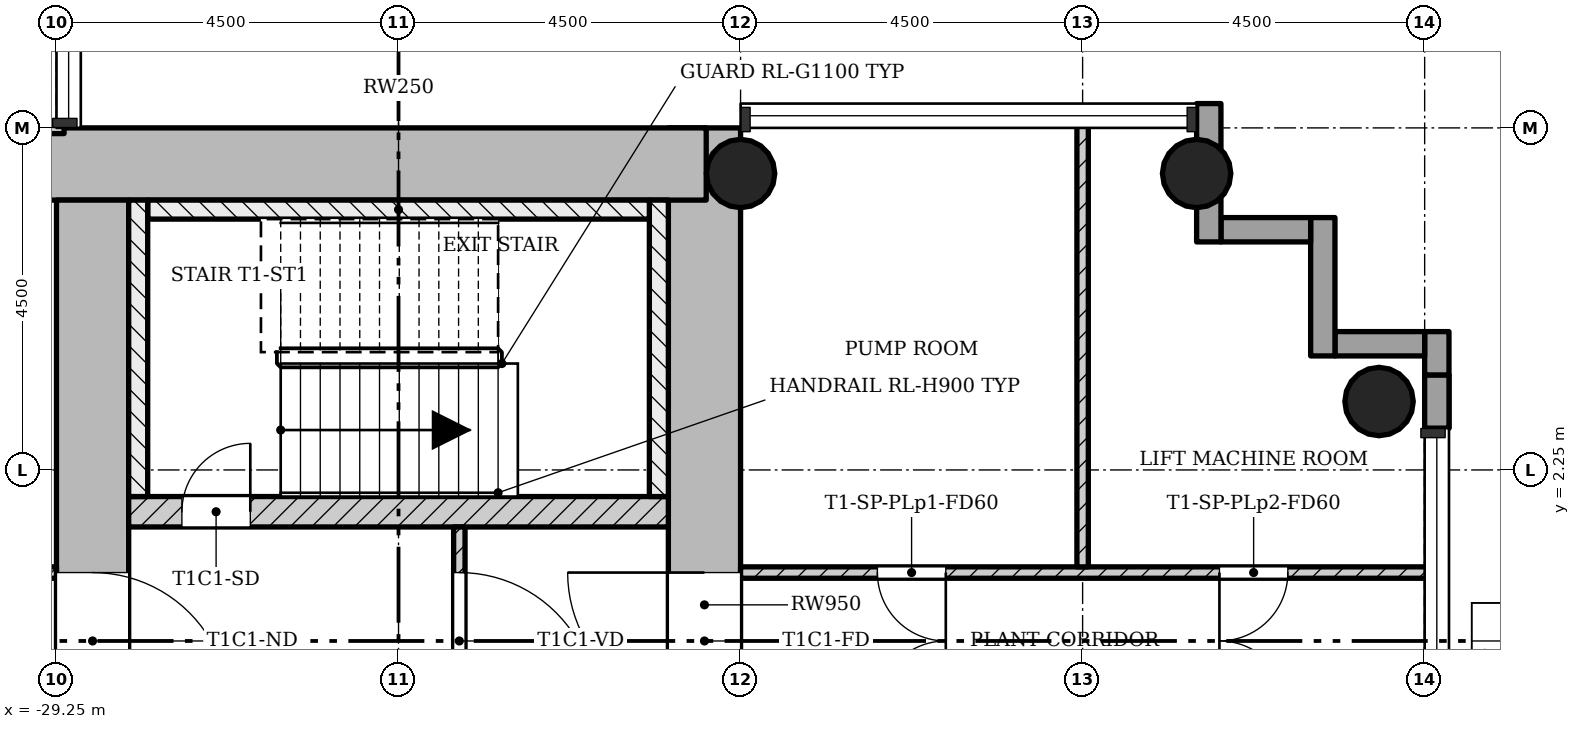
"""IFC4 building model, lengths in metres.
Left out: names, types, materials, properties, quantities, classifications, styles, units other than length and angle.
Written with IfcOpenShell. Run it as: python <this file> out.ifc"""

import sys

from ifc_helpers import new_model, si_unit, direction, frame, frame_2d, origin, origin_2d, place, context, subcontext, project, spatial, rectangle, hollow_circle, extrude, element, fill, save


model = new_model("IFC4")
c1 = context("Model", 3, precision=1e-05, world=origin(), true_north=direction((0.0, 1.0)))
c2 = subcontext(c1, "Body", "Model", "MODEL_VIEW")
j1 = project(units=[si_unit("LENGTHUNIT", "METRE"), si_unit("PLANEANGLEUNIT", "RADIAN")], contexts=[c1])
p1 = place(None, origin())
s1 = spatial("IfcSite", under=j1, at=p1, CompositionType="ELEMENT")
p2 = place(p1, origin())
s2 = spatial("IfcBuilding", under=s1, at=p2, CompositionType="ELEMENT")
p3 = place(p2, frame((0.0, 0.0, 124.2)))
s3 = spatial("IfcBuildingStorey", under=s2, at=p3, CompositionType="ELEMENT", Elevation=124.2)
p4 = place(p3, frame((-20.725, -5.8, 0.0), z_axis=(0.0, 0.0, 1.0), x_axis=(0.0, 1.0, 0.0)))
e1 = element("IfcWall", 1, at=p4, inside=s3, PredefinedType="SHEAR", context=c2, shape_type="SweptSolid", body=[
    extrude(rectangle(XDim=12.55, YDim=0.95, at=frame_2d((6.275, 0.0))), origin(), (0.0, 0.0, 1.0), 4.5),
])
p5 = place(p4, frame((4.9, 0.0, 0.0)))
e2 = element("IfcOpeningElement", 2, at=p5, cuts=e1, PredefinedType="OPENING", context=c2, shape_type="SweptSolid", body=[
    extrude(rectangle(XDim=1.8, YDim=2.1, at=frame_2d((0.9, 1.05))), frame((0.0, 0.485, 0.0), z_axis=(0.0, -1.0, 0.0), x_axis=(1.0, 0.0, 0.0)), (0.0, 0.0, 1.0), 0.97),
])
p6 = place(p3, frame((-20.702, 6.275, 0.0), z_axis=(0.0, 0.0, 1.0), x_axis=(-1.0, 0.0, 0.0)))
e3 = element("IfcWall", 3, at=p6, inside=s3, PredefinedType="SHEAR", context=c2, shape_type="SweptSolid", body=[
    extrude(rectangle(XDim=8.696, YDim=0.95, at=frame_2d((4.348, 0.0))), origin(), (0.0, 0.0, 1.0), 4.5),
])
p7 = place(p3, frame((-28.775, 5.8, 0.0), z_axis=(0.0, 0.0, 1.0), x_axis=(0.0, -1.0, 0.0)))
e4 = element("IfcWall", 4, at=p7, inside=s3, PredefinedType="SHEAR", context=c2, shape_type="SweptSolid", body=[
    extrude(rectangle(XDim=12.55, YDim=0.95, at=frame_2d((6.275, 0.0))), origin(), (0.0, 0.0, 1.0), 4.5),
])
p8 = place(p7, frame((4.9, 0.0, 0.0)))
e5 = element("IfcOpeningElement", 5, at=p8, cuts=e4, PredefinedType="OPENING", context=c2, shape_type="SweptSolid", body=[
    extrude(rectangle(XDim=1.8, YDim=2.1, at=frame_2d((0.9, 1.05))), frame((0.0, 0.485, 0.0), z_axis=(0.0, -1.0, 0.0), x_axis=(1.0, 0.0, 0.0)), (0.0, 0.0, 1.0), 0.97),
])
p9 = place(p3, frame((-28.3, 1.7, 0.0), z_axis=(0.0, 0.0, 1.0), x_axis=(1.0, 0.0, 0.0)))
e6 = element("IfcWall", 6, at=p9, inside=s3, PredefinedType="SHEAR", context=c2, shape_type="SweptSolid", body=[
    extrude(rectangle(XDim=7.1, YDim=0.4, at=frame_2d((3.55, 0.0))), origin(), (0.0, 0.0, 1.0), 4.5),
])
p10 = place(p9, frame((0.7, 0.0, 0.0)))
e7 = element("IfcOpeningElement", 7, at=p10, cuts=e6, PredefinedType="OPENING", context=c2, shape_type="SweptSolid", body=[
    extrude(rectangle(XDim=0.9, YDim=2.1, at=frame_2d((0.45, 1.05))), frame((0.0, 0.21, 0.0), z_axis=(0.0, -1.0, 0.0), x_axis=(1.0, 0.0, 0.0)), (0.0, 0.0, 1.0), 0.42),
])
for number, where, z_axis, x_axis in (
    (8, (-20.25, 6.15, 0.0), (0.0, 0.0, 1.0), (1.0, 0.0, 0.0)),
    (9, (-14.25, 6.15, 0.0), (0.0, 0.0, 1.0), (1.0, 0.0, 0.0)),
    (10, (-11.85, 3.15, 0.0), (0.0, 0.0, 1.0), (1.0, 0.0, 0.0)),
):
    element("IfcColumn", number, at=place(p3, frame(where, z_axis=z_axis, x_axis=x_axis)), inside=s3, PredefinedType="COLUMN", context=c2, shape_type="SweptSolid", body=[
        extrude(hollow_circle(Radius=0.45, WallThickness=0.032, at=origin_2d()), origin(), (0.0, 0.0, 1.0), 4.5),
    ])
p11 = place(p3, frame((-11.09, 2.8, 0.0), z_axis=(0.0, 0.0, 1.0), x_axis=(0.0, 1.0, 0.0)))
e11 = element("IfcWall", 11, at=p11, inside=s3, PredefinedType="STANDARD", context=c2, shape_type="SweptSolid", body=[
    extrude(rectangle(XDim=0.7, YDim=0.32, at=frame_2d((0.35, 0.0))), origin(), (0.0, 0.0, 1.0), 3.61),
])
p12 = place(p3, frame((-11.09, 2.8, 4.08), z_axis=(0.0, 0.0, 1.0), x_axis=(0.0, 1.0, 0.0)))
e12 = element("IfcWall", 12, at=p12, inside=s3, PredefinedType="STANDARD", context=c2, shape_type="SweptSolid", body=[
    extrude(rectangle(XDim=0.7, YDim=0.32, at=frame_2d((0.35, 0.0))), origin(), (0.0, 0.0, 1.0), 0.12),
])
p13 = place(p3, frame((-11.09, 3.5, 0.0), z_axis=(0.0, 0.0, 1.0), x_axis=(0.0, 1.0, 0.0)))
e13 = element("IfcWall", 13, at=p13, inside=s3, PredefinedType="STANDARD", context=c2, shape_type="SweptSolid", body=[
    extrude(rectangle(XDim=0.57, YDim=0.32, at=frame_2d((0.285, 0.0))), origin(), (0.0, 0.0, 1.0), 4.2),
])
p14 = place(p3, frame((-11.25, 3.91, -0.3), z_axis=(0.0, 0.0, 1.0), x_axis=(-1.0, 0.0, 0.0)))
e14 = element("IfcWall", 14, at=p14, inside=s3, PredefinedType="STANDARD", context=c2, shape_type="SweptSolid", body=[
    extrude(rectangle(XDim=1.18, YDim=0.32, at=frame_2d((0.59, 0.0))), origin(), (0.0, 0.0, 1.0), 4.5),
])
p15 = place(p3, frame((-12.59, 3.75, -0.3), z_axis=(0.0, 0.0, 1.0), x_axis=(0.0, 1.0, 0.0)))
e15 = element("IfcWall", 15, at=p15, inside=s3, PredefinedType="STANDARD", context=c2, shape_type="SweptSolid", body=[
    extrude(rectangle(XDim=1.82, YDim=0.32, at=frame_2d((0.91, 0.0))), origin(), (0.0, 0.0, 1.0), 4.5),
])
p16 = place(p3, frame((-12.75, 5.41, -0.3), z_axis=(0.0, 0.0, 1.0), x_axis=(-1.0, 0.0, 0.0)))
e16 = element("IfcWall", 16, at=p16, inside=s3, PredefinedType="STANDARD", context=c2, shape_type="SweptSolid", body=[
    extrude(rectangle(XDim=1.18, YDim=0.32, at=frame_2d((0.59, 0.0))), origin(), (0.0, 0.0, 1.0), 4.5),
])
p17 = place(p3, frame((-14.09, 5.25, -0.3), z_axis=(0.0, 0.0, 1.0), x_axis=(0.0, 1.0, 0.0)))
e17 = element("IfcWall", 17, at=p17, inside=s3, PredefinedType="STANDARD", context=c2, shape_type="SweptSolid", body=[
    extrude(rectangle(XDim=1.82, YDim=0.32, at=frame_2d((0.91, 0.0))), origin(), (0.0, 0.0, 1.0), 4.5),
])
p18 = place(p3, frame((-23.95, -1.5, 0.0), z_axis=(0.0, 0.0, 1.0), x_axis=(0.0, 1.0, 0.0)))
e18 = element("IfcWall", 18, at=p18, inside=s3, PredefinedType="PARTITIONING", context=c2, shape_type="SweptSolid", body=[
    extrude(rectangle(XDim=3.0, YDim=0.15, at=frame_2d((1.5, 0.0))), origin(), (0.0, 0.0, 1.0), 4.1),
])
p19 = place(p18, frame((0.6, 0.0, 0.0)))
e19 = element("IfcOpeningElement", 19, at=p19, cuts=e18, PredefinedType="OPENING", context=c2, shape_type="SweptSolid", body=[
    extrude(rectangle(XDim=1.8, YDim=2.1, at=frame_2d((0.9, 1.05))), frame((0.0, 0.085, 0.0), z_axis=(0.0, -1.0, 0.0), x_axis=(1.0, 0.0, 0.0)), (0.0, 0.0, 1.0), 0.17),
])
p20 = place(p3, frame((-35.1, 0.9, 0.0), z_axis=(0.0, 0.0, 1.0), x_axis=(1.0, 0.0, 0.0)))
e20 = element("IfcWall", 20, at=p20, inside=s3, PredefinedType="PARTITIONING", context=c2, shape_type="SweptSolid", body=[
    extrude(rectangle(XDim=5.85, YDim=0.15, at=frame_2d((2.925, 0.0))), origin(), (0.0, 0.0, 1.0), 4.1),
])
p21 = place(p20, frame((2.475, 0.0, 0.0)))
e21 = element("IfcOpeningElement", 21, at=p21, cuts=e20, PredefinedType="OPENING", context=c2, shape_type="SweptSolid", body=[
    extrude(rectangle(XDim=0.9, YDim=2.1, at=frame_2d((0.45, 1.05))), frame((0.0, 0.085, 0.0), z_axis=(0.0, -1.0, 0.0), x_axis=(1.0, 0.0, 0.0)), (0.0, 0.0, 1.0), 0.17),
])
p22 = place(p3, frame((-20.25, 0.9, 0.0), z_axis=(0.0, 0.0, 1.0), x_axis=(1.0, 0.0, 0.0)))
e22 = element("IfcWall", 22, at=p22, inside=s3, PredefinedType="PARTITIONING", context=c2, shape_type="SweptSolid", body=[
    extrude(rectangle(XDim=9.1, YDim=0.15, at=frame_2d((4.55, 0.0))), origin(), (0.0, 0.0, 1.0), 4.1),
])
p23 = place(p22, frame((1.8, 0.0, 0.0)))
e23 = element("IfcOpeningElement", 23, at=p23, cuts=e22, PredefinedType="OPENING", context=c2, shape_type="SweptSolid", body=[
    extrude(rectangle(XDim=0.9, YDim=2.1, at=frame_2d((0.45, 1.05))), frame((0.0, 0.085, 0.0), z_axis=(0.0, -1.0, 0.0), x_axis=(1.0, 0.0, 0.0)), (0.0, 0.0, 1.0), 0.17),
])
p24 = place(p22, frame((6.3, 0.0, 0.0)))
e24 = element("IfcOpeningElement", 24, at=p24, cuts=e22, PredefinedType="OPENING", context=c2, shape_type="SweptSolid", body=[
    extrude(rectangle(XDim=0.9, YDim=2.1, at=frame_2d((0.45, 1.05))), frame((0.0, 0.085, 0.0), z_axis=(0.0, -1.0, 0.0), x_axis=(1.0, 0.0, 0.0)), (0.0, 0.0, 1.0), 0.17),
])
p25 = place(p3, frame((-15.75, 0.975, 0.0), z_axis=(0.0, 0.0, 1.0), x_axis=(0.0, 1.0, 0.0)))
e25 = element("IfcWall", 25, at=p25, inside=s3, PredefinedType="PARTITIONING", context=c2, shape_type="SweptSolid", body=[
    extrude(rectangle(XDim=5.875, YDim=0.15, at=frame_2d((2.938, 0.0))), origin(), (0.0, 0.0, 1.0), 4.1),
])
p26 = place(p3, frame((-42.85, 6.75, 0.0), z_axis=(0.0, 0.0, 1.0), x_axis=(1.0, 0.0, 0.0)))
e26 = element("IfcWall", 26, at=p26, inside=s3, PredefinedType="PARTITIONING", context=c2, shape_type="SweptSolid", body=[
    extrude(rectangle(XDim=13.7, YDim=0.15, at=frame_2d((6.85, 0.0))), origin(), (0.0, 0.0, 1.0), 4.1),
])
p27 = place(p26, frame((5.95, 0.0, 0.0)))
e27 = element("IfcOpeningElement", 27, at=p27, cuts=e26, PredefinedType="OPENING", context=c2, shape_type="SweptSolid", body=[
    extrude(rectangle(XDim=1.8, YDim=2.1, at=frame_2d((0.9, 1.05))), frame((0.0, 0.085, 0.0), z_axis=(0.0, -1.0, 0.0), x_axis=(1.0, 0.0, 0.0)), (0.0, 0.0, 1.0), 0.17),
])
p28 = place(p3, frame((-21.325, 1.9, 0.0), z_axis=(0.0, 0.0, 1.0), x_axis=(0.0, 1.0, 0.0)))
e28 = element("IfcWall", 28, at=p28, inside=s3, PredefinedType="SHEAR", context=c2, shape_type="SweptSolid", body=[
    extrude(rectangle(XDim=3.9, YDim=0.25, at=frame_2d((1.95, 0.0))), origin(), (0.0, 0.0, 1.0), 4.5),
])
p29 = place(p3, frame((-28.05, 5.675, 0.0), z_axis=(0.0, 0.0, 1.0), x_axis=(1.0, 0.0, 0.0)))
e29 = element("IfcWall", 29, at=p29, inside=s3, PredefinedType="SHEAR", context=c2, shape_type="SweptSolid", body=[
    extrude(rectangle(XDim=6.6, YDim=0.25, at=frame_2d((3.3, 0.0))), origin(), (0.0, 0.0, 1.0), 4.5),
])
p30 = place(p3, frame((-28.175, 1.9, 0.0), z_axis=(0.0, 0.0, 1.0), x_axis=(0.0, 1.0, 0.0)))
e30 = element("IfcWall", 30, at=p30, inside=s3, PredefinedType="SHEAR", context=c2, shape_type="SweptSolid", body=[
    extrude(rectangle(XDim=3.9, YDim=0.25, at=frame_2d((1.95, 0.0))), origin(), (0.0, 0.0, 1.0), 4.5),
])
p31 = place(p19, origin())
e31 = element("IfcDoor", 31, at=p31, inside=s3, OperationType="SINGLE_SWING_LEFT", PredefinedType="DOOR", context=c2, shape_type="SweptSolid", body=[
    extrude(rectangle(XDim=1.8, YDim=2.1, at=frame_2d((0.9, 1.05))), frame((0.0, 0.025, 0.0), z_axis=(0.0, -1.0, 0.0), x_axis=(1.0, 0.0, 0.0)), (0.0, 0.0, 1.0), 0.05),
])
fill(e19, e31)
p32 = place(p23, origin())
e32 = element("IfcDoor", 32, at=p32, inside=s3, OperationType="SINGLE_SWING_RIGHT", PredefinedType="DOOR", context=c2, shape_type="SweptSolid", body=[
    extrude(rectangle(XDim=0.9, YDim=2.1, at=frame_2d((0.45, 1.05))), frame((0.0, 0.025, 0.0), z_axis=(0.0, -1.0, 0.0), x_axis=(1.0, 0.0, 0.0)), (0.0, 0.0, 1.0), 0.05),
])
fill(e23, e32)
p33 = place(p24, origin())
e33 = element("IfcDoor", 33, at=p33, inside=s3, OperationType="SINGLE_SWING_LEFT", PredefinedType="DOOR", context=c2, shape_type="SweptSolid", body=[
    extrude(rectangle(XDim=0.9, YDim=2.1, at=frame_2d((0.45, 1.05))), frame((0.0, 0.025, 0.0), z_axis=(0.0, -1.0, 0.0), x_axis=(1.0, 0.0, 0.0)), (0.0, 0.0, 1.0), 0.05),
])
fill(e24, e33)
p34 = place(p10, origin())
e34 = element("IfcDoor", 34, at=p34, inside=s3, OperationType="SINGLE_SWING_LEFT", PredefinedType="DOOR", context=c2, shape_type="SweptSolid", body=[
    extrude(rectangle(XDim=0.9, YDim=2.1, at=frame_2d((0.45, 1.05))), frame((0.0, 0.025, 0.0), z_axis=(0.0, -1.0, 0.0), x_axis=(1.0, 0.0, 0.0)), (0.0, 0.0, 1.0), 0.05),
])
fill(e7, e34)
p35 = place(p8, origin())
e35 = element("IfcDoor", 35, at=p35, inside=s3, OperationType="SINGLE_SWING_LEFT", PredefinedType="DOOR", context=c2, shape_type="SweptSolid", body=[
    extrude(rectangle(XDim=1.8, YDim=2.1, at=frame_2d((0.9, 1.05))), frame((0.0, 0.025, 0.0), z_axis=(0.0, -1.0, 0.0), x_axis=(1.0, 0.0, 0.0)), (0.0, 0.0, 1.0), 0.05),
])
fill(e5, e35)
p36 = place(p5, origin())
e36 = element("IfcDoor", 36, at=p36, inside=s3, OperationType="SINGLE_SWING_LEFT", PredefinedType="DOOR", context=c2, shape_type="SweptSolid", body=[
    extrude(rectangle(XDim=1.8, YDim=2.1, at=frame_2d((0.9, 1.05))), frame((0.0, 0.025, 0.0), z_axis=(0.0, -1.0, 0.0), x_axis=(1.0, 0.0, 0.0)), (0.0, 0.0, 1.0), 0.05),
])
fill(e2, e36)
save(model, sys.argv[1])
